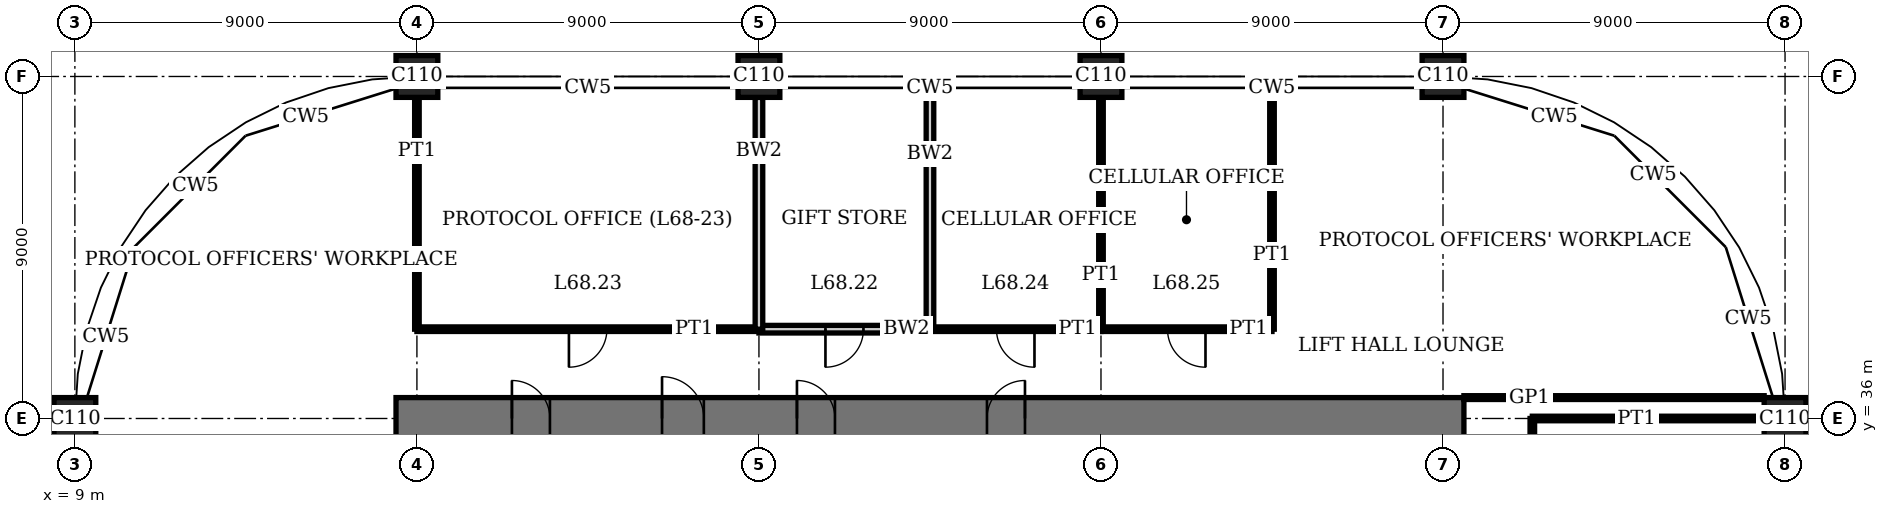
"""IFC4 building model, lengths in metres.
Left out: names, types, materials, properties, quantities, classifications, styles, units other than length and angle.
Written with IfcOpenShell. Run it as: python <this file> out.ifc"""

import sys

from ifc_helpers import new_model, si_unit, direction, frame, frame_2d, origin, origin_2d, place, context, subcontext, project, spatial, rectangle, extrude, element, fill, save


model = new_model("IFC4")
c1 = context("Model", 3, precision=1e-05, world=origin(), true_north=direction((0.0, 1.0)))
c2 = subcontext(c1, "Body", "Model", "MODEL_VIEW")
j1 = project(units=[si_unit("LENGTHUNIT", "METRE"), si_unit("PLANEANGLEUNIT", "RADIAN")], contexts=[c1])
p1 = place(None, origin())
s1 = spatial("IfcSite", under=j1, at=p1, CompositionType="ELEMENT")
p2 = place(p1, origin())
s2 = spatial("IfcBuilding", under=s1, at=p2, CompositionType="ELEMENT")
p3 = place(p2, frame((0.0, 0.0, 279.4)))
s3 = spatial("IfcBuildingStorey", under=s2, at=p3, CompositionType="ELEMENT", Elevation=279.4)
for number, where, z_axis, x_axis in (
    (1, (9.0, 36.0, 0.0), (0.0, 0.0, 1.0), (1.0, 0.0, 0.0)),
    (2, (18.0, 45.0, 0.0), (0.0, 0.0, 1.0), (1.0, 0.0, 0.0)),
    (3, (27.0, 45.0, 0.0), (0.0, 0.0, 1.0), (1.0, 0.0, 0.0)),
    (4, (36.0, 45.0, 0.0), (0.0, 0.0, 1.0), (1.0, 0.0, 0.0)),
    (5, (45.0, 45.0, 0.0), (0.0, 0.0, 1.0), (1.0, 0.0, 0.0)),
    (6, (54.0, 36.0, 0.0), (0.0, 0.0, 1.0), (1.0, 0.0, 0.0)),
):
    element("IfcColumn", number, at=place(p3, frame(where, z_axis=z_axis, x_axis=x_axis)), inside=s3, PredefinedType="COLUMN", context=c2, shape_type="SweptSolid", body=[
        extrude(rectangle(XDim=1.1, YDim=1.1, at=origin_2d()), origin(), (0.0, 0.0, 1.0), 4.0),
    ])
p4 = place(p3, frame((45.55, 36.0, 0.0), z_axis=(0.0, 0.0, 1.0), x_axis=(-1.0, 0.0, 0.0)))
e7 = element("IfcWall", 7, at=p4, inside=s3, PredefinedType="SHEAR", context=c2, shape_type="SweptSolid", body=[
    extrude(rectangle(XDim=28.1, YDim=1.1, at=frame_2d((14.05, 0.0))), origin(), (0.0, 0.0, 1.0), 4.0),
])
p5 = place(p4, frame((11.55, 0.0, 0.0)))
e8 = element("IfcOpeningElement", 8, at=p5, cuts=e7, PredefinedType="OPENING", context=c2, shape_type="SweptSolid", body=[
    extrude(rectangle(XDim=1.0, YDim=2.4, at=frame_2d((0.5, 1.2))), frame((0.0, 0.56, 0.0), z_axis=(0.0, -1.0, 0.0), x_axis=(1.0, 0.0, 0.0)), (0.0, 0.0, 1.0), 1.12),
])
p6 = place(p4, frame((16.55, 0.0, 0.0)))
e9 = element("IfcOpeningElement", 9, at=p6, cuts=e7, PredefinedType="OPENING", context=c2, shape_type="SweptSolid", body=[
    extrude(rectangle(XDim=1.0, YDim=2.4, at=frame_2d((0.5, 1.2))), frame((0.0, 0.56, 0.0), z_axis=(0.0, -1.0, 0.0), x_axis=(1.0, 0.0, 0.0)), (0.0, 0.0, 1.0), 1.12),
])
p7 = place(p4, frame((20.0, 0.0, 0.0)))
e10 = element("IfcOpeningElement", 10, at=p7, cuts=e7, PredefinedType="OPENING", context=c2, shape_type="SweptSolid", body=[
    extrude(rectangle(XDim=1.1, YDim=2.4, at=frame_2d((0.55, 1.2))), frame((0.0, 0.56, 0.0), z_axis=(0.0, -1.0, 0.0), x_axis=(1.0, 0.0, 0.0)), (0.0, 0.0, 1.0), 1.12),
])
p8 = place(p4, frame((24.05, 0.0, 0.0)))
e11 = element("IfcOpeningElement", 11, at=p8, cuts=e7, PredefinedType="OPENING", context=c2, shape_type="SweptSolid", body=[
    extrude(rectangle(XDim=1.0, YDim=2.4, at=frame_2d((0.5, 1.2))), frame((0.0, 0.56, 0.0), z_axis=(0.0, -1.0, 0.0), x_axis=(1.0, 0.0, 0.0)), (0.0, 0.0, 1.0), 1.12),
])
p9 = place(p3, frame((47.35, 36.0, 0.0), z_axis=(0.0, 0.0, 1.0), x_axis=(1.0, 0.0, 0.0)))
e12 = element("IfcWall", 12, at=p9, inside=s3, PredefinedType="PARTITIONING", context=c2, shape_type="SweptSolid", body=[
    extrude(rectangle(XDim=6.1, YDim=0.12, at=frame_2d((3.05, 0.0))), origin(), (0.0, 0.0, 1.0), 3.05),
])
p10 = place(p3, frame((45.55, 36.55, 0.0), z_axis=(0.0, 0.0, 1.0), x_axis=(1.0, 0.0, 0.0)))
e13 = element("IfcWall", 13, at=p10, inside=s3, PredefinedType="PARTITIONING", context=c2, shape_type="SweptSolid", body=[
    extrude(rectangle(XDim=7.9, YDim=0.1, at=frame_2d((3.95, 0.0))), origin(), (0.0, 0.0, 1.0), 3.75),
])
p11 = place(p3, frame((27.0, 38.35, 0.0), z_axis=(0.0, 0.0, 1.0), x_axis=(1.0, 0.0, 0.0)))
e14 = element("IfcWall", 14, at=p11, inside=s3, PredefinedType="SOLIDWALL", context=c2, shape_type="SweptSolid", body=[
    extrude(rectangle(XDim=4.5, YDim=0.2, at=frame_2d((2.25, 0.0))), origin(), (0.0, 0.0, 1.0), 3.75),
])
p12 = place(p11, frame((1.75, 0.0, 0.0)))
e15 = element("IfcOpeningElement", 15, at=p12, cuts=e14, PredefinedType="OPENING", context=c2, shape_type="SweptSolid", body=[
    extrude(rectangle(XDim=1.0, YDim=2.4, at=frame_2d((0.5, 1.2))), frame((0.0, 0.11, 0.0), z_axis=(0.0, -1.0, 0.0), x_axis=(1.0, 0.0, 0.0)), (0.0, 0.0, 1.0), 0.22),
])
p13 = place(p3, frame((18.0, 38.35, 0.0), z_axis=(0.0, 0.0, 1.0), x_axis=(1.0, 0.0, 0.0)))
e16 = element("IfcWall", 16, at=p13, inside=s3, PredefinedType="PARTITIONING", context=c2, shape_type="SweptSolid", body=[
    extrude(rectangle(XDim=9.0, YDim=0.12, at=frame_2d((4.5, 0.0))), origin(), (0.0, 0.0, 1.0), 3.75),
])
p14 = place(p13, frame((4.0, 0.0, 0.0)))
e17 = element("IfcOpeningElement", 17, at=p14, cuts=e16, PredefinedType="OPENING", context=c2, shape_type="SweptSolid", body=[
    extrude(rectangle(XDim=1.0, YDim=2.4, at=frame_2d((0.5, 1.2))), frame((0.0, 0.07, 0.0), z_axis=(0.0, -1.0, 0.0), x_axis=(1.0, 0.0, 0.0)), (0.0, 0.0, 1.0), 0.14),
])
p15 = place(p3, frame((31.5, 38.35, 0.0), z_axis=(0.0, 0.0, 1.0), x_axis=(1.0, 0.0, 0.0)))
e18 = element("IfcWall", 18, at=p15, inside=s3, PredefinedType="PARTITIONING", context=c2, shape_type="SweptSolid", body=[
    extrude(rectangle(XDim=4.5, YDim=0.12, at=frame_2d((2.25, 0.0))), origin(), (0.0, 0.0, 1.0), 3.75),
])
p16 = place(p15, frame((1.75, 0.0, 0.0)))
e19 = element("IfcOpeningElement", 19, at=p16, cuts=e18, PredefinedType="OPENING", context=c2, shape_type="SweptSolid", body=[
    extrude(rectangle(XDim=1.0, YDim=2.4, at=frame_2d((0.5, 1.2))), frame((0.0, 0.07, 0.0), z_axis=(0.0, -1.0, 0.0), x_axis=(1.0, 0.0, 0.0)), (0.0, 0.0, 1.0), 0.14),
])
p17 = place(p3, frame((36.0, 38.35, 0.0), z_axis=(0.0, 0.0, 1.0), x_axis=(1.0, 0.0, 0.0)))
e20 = element("IfcWall", 20, at=p17, inside=s3, PredefinedType="PARTITIONING", context=c2, shape_type="SweptSolid", body=[
    extrude(rectangle(XDim=4.5, YDim=0.12, at=frame_2d((2.25, 0.0))), origin(), (0.0, 0.0, 1.0), 3.75),
])
p18 = place(p17, frame((1.75, 0.0, 0.0)))
e21 = element("IfcOpeningElement", 21, at=p18, cuts=e20, PredefinedType="OPENING", context=c2, shape_type="SweptSolid", body=[
    extrude(rectangle(XDim=1.0, YDim=2.4, at=frame_2d((0.5, 1.2))), frame((0.0, 0.07, 0.0), z_axis=(0.0, -1.0, 0.0), x_axis=(1.0, 0.0, 0.0)), (0.0, 0.0, 1.0), 0.14),
])
p19 = place(p3, frame((18.0, 38.35, 0.0), z_axis=(0.0, 0.0, 1.0), x_axis=(0.0, 1.0, 0.0)))
e22 = element("IfcWall", 22, at=p19, inside=s3, PredefinedType="PARTITIONING", context=c2, shape_type="SweptSolid", body=[
    extrude(rectangle(XDim=6.1, YDim=0.12, at=frame_2d((3.05, 0.0))), origin(), (0.0, 0.0, 1.0), 3.05),
])
p20 = place(p3, frame((27.0, 38.35, 0.0), z_axis=(0.0, 0.0, 1.0), x_axis=(0.0, 1.0, 0.0)))
e23 = element("IfcWall", 23, at=p20, inside=s3, PredefinedType="SOLIDWALL", context=c2, shape_type="SweptSolid", body=[
    extrude(rectangle(XDim=6.1, YDim=0.2, at=frame_2d((3.05, 0.0))), origin(), (0.0, 0.0, 1.0), 3.05),
])
p21 = place(p3, frame((31.5, 38.35, 0.0), z_axis=(0.0, 0.0, 1.0), x_axis=(0.0, 1.0, 0.0)))
e24 = element("IfcWall", 24, at=p21, inside=s3, PredefinedType="SOLIDWALL", context=c2, shape_type="SweptSolid", body=[
    extrude(rectangle(XDim=6.34, YDim=0.2, at=frame_2d((3.17, 0.0))), origin(), (0.0, 0.0, 1.0), 3.75),
])
p22 = place(p3, frame((36.0, 38.35, 0.0), z_axis=(0.0, 0.0, 1.0), x_axis=(0.0, 1.0, 0.0)))
e25 = element("IfcWall", 25, at=p22, inside=s3, PredefinedType="PARTITIONING", context=c2, shape_type="SweptSolid", body=[
    extrude(rectangle(XDim=6.1, YDim=0.12, at=frame_2d((3.05, 0.0))), origin(), (0.0, 0.0, 1.0), 3.05),
])
p23 = place(p3, frame((40.5, 38.35, 0.0), z_axis=(0.0, 0.0, 1.0), x_axis=(0.0, 1.0, 0.0)))
e26 = element("IfcWall", 26, at=p23, inside=s3, PredefinedType="PARTITIONING", context=c2, shape_type="SweptSolid", body=[
    extrude(rectangle(XDim=6.34, YDim=0.12, at=frame_2d((3.17, 0.0))), origin(), (0.0, 0.0, 1.0), 3.75),
])
p24 = place(p3, frame((47.35, 31.5, 0.0), z_axis=(0.0, 0.0, 1.0), x_axis=(0.0, 1.0, 0.0)))
e27 = element("IfcWall", 27, at=p24, inside=s3, PredefinedType="PARTITIONING", context=c2, shape_type="SweptSolid", body=[
    extrude(rectangle(XDim=4.5, YDim=0.12, at=frame_2d((2.25, 0.0))), origin(), (0.0, 0.0, 1.0), 3.75),
])
p25 = place(p24, frame((1.75, 0.0, 0.0)))
e28 = element("IfcOpeningElement", 28, at=p25, cuts=e27, PredefinedType="OPENING", context=c2, shape_type="SweptSolid", body=[
    extrude(rectangle(XDim=1.0, YDim=2.4, at=frame_2d((0.5, 1.2))), frame((0.0, 0.07, 0.0), z_axis=(0.0, -1.0, 0.0), x_axis=(1.0, 0.0, 0.0)), (0.0, 0.0, 1.0), 0.14),
])
p26 = place(p5, origin())
e29 = element("IfcDoor", 29, at=p26, inside=s3, OperationType="SINGLE_SWING_LEFT", PredefinedType="DOOR", context=c2, shape_type="SweptSolid", body=[
    extrude(rectangle(XDim=1.0, YDim=2.4, at=frame_2d((0.5, 1.2))), frame((0.0, 0.025, 0.0), z_axis=(0.0, -1.0, 0.0), x_axis=(1.0, 0.0, 0.0)), (0.0, 0.0, 1.0), 0.05),
    extrude(rectangle(XDim=0.04, YDim=2.4, at=frame_2d((0.02, 1.2))), frame((0.0, 0.4, 0.0), z_axis=(0.0, -1.0, 0.0), x_axis=(1.0, 0.0, 0.0)), (0.0, 0.0, 1.0), 0.8),
    extrude(rectangle(XDim=0.04, YDim=2.4, at=frame_2d((0.98, 1.2))), frame((0.0, 0.4, 0.0), z_axis=(0.0, -1.0, 0.0), x_axis=(1.0, 0.0, 0.0)), (0.0, 0.0, 1.0), 0.8),
    extrude(rectangle(XDim=1.0, YDim=0.04, at=frame_2d((0.5, 2.38))), frame((0.0, 0.4, 0.0), z_axis=(0.0, -1.0, 0.0), x_axis=(1.0, 0.0, 0.0)), (0.0, 0.0, 1.0), 0.8),
])
fill(e8, e29)
p27 = place(p6, origin())
e30 = element("IfcDoor", 30, at=p27, inside=s3, OperationType="SINGLE_SWING_RIGHT", PredefinedType="DOOR", context=c2, shape_type="SweptSolid", body=[
    extrude(rectangle(XDim=1.0, YDim=2.4, at=frame_2d((0.5, 1.2))), frame((0.0, 0.025, 0.0), z_axis=(0.0, -1.0, 0.0), x_axis=(1.0, 0.0, 0.0)), (0.0, 0.0, 1.0), 0.05),
    extrude(rectangle(XDim=0.04, YDim=2.4, at=frame_2d((0.02, 1.2))), frame((0.0, 0.4, 0.0), z_axis=(0.0, -1.0, 0.0), x_axis=(1.0, 0.0, 0.0)), (0.0, 0.0, 1.0), 0.8),
    extrude(rectangle(XDim=0.04, YDim=2.4, at=frame_2d((0.98, 1.2))), frame((0.0, 0.4, 0.0), z_axis=(0.0, -1.0, 0.0), x_axis=(1.0, 0.0, 0.0)), (0.0, 0.0, 1.0), 0.8),
    extrude(rectangle(XDim=1.0, YDim=0.04, at=frame_2d((0.5, 2.38))), frame((0.0, 0.4, 0.0), z_axis=(0.0, -1.0, 0.0), x_axis=(1.0, 0.0, 0.0)), (0.0, 0.0, 1.0), 0.8),
])
fill(e9, e30)
p28 = place(p7, origin())
e31 = element("IfcDoor", 31, at=p28, inside=s3, OperationType="SINGLE_SWING_RIGHT", PredefinedType="DOOR", context=c2, shape_type="SweptSolid", body=[
    extrude(rectangle(XDim=1.1, YDim=2.4, at=frame_2d((0.55, 1.2))), frame((0.0, 0.025, 0.0), z_axis=(0.0, -1.0, 0.0), x_axis=(1.0, 0.0, 0.0)), (0.0, 0.0, 1.0), 0.05),
    extrude(rectangle(XDim=0.04, YDim=2.4, at=frame_2d((0.02, 1.2))), frame((0.0, 0.44, 0.0), z_axis=(0.0, -1.0, 0.0), x_axis=(1.0, 0.0, 0.0)), (0.0, 0.0, 1.0), 0.88),
    extrude(rectangle(XDim=0.04, YDim=2.4, at=frame_2d((1.08, 1.2))), frame((0.0, 0.44, 0.0), z_axis=(0.0, -1.0, 0.0), x_axis=(1.0, 0.0, 0.0)), (0.0, 0.0, 1.0), 0.88),
    extrude(rectangle(XDim=1.1, YDim=0.04, at=frame_2d((0.55, 2.38))), frame((0.0, 0.44, 0.0), z_axis=(0.0, -1.0, 0.0), x_axis=(1.0, 0.0, 0.0)), (0.0, 0.0, 1.0), 0.88),
])
fill(e10, e31)
p29 = place(p8, origin())
e32 = element("IfcDoor", 32, at=p29, inside=s3, OperationType="SINGLE_SWING_RIGHT", PredefinedType="DOOR", context=c2, shape_type="SweptSolid", body=[
    extrude(rectangle(XDim=1.0, YDim=2.4, at=frame_2d((0.5, 1.2))), frame((0.0, 0.025, 0.0), z_axis=(0.0, -1.0, 0.0), x_axis=(1.0, 0.0, 0.0)), (0.0, 0.0, 1.0), 0.05),
    extrude(rectangle(XDim=0.04, YDim=2.4, at=frame_2d((0.02, 1.2))), frame((0.0, 0.4, 0.0), z_axis=(0.0, -1.0, 0.0), x_axis=(1.0, 0.0, 0.0)), (0.0, 0.0, 1.0), 0.8),
    extrude(rectangle(XDim=0.04, YDim=2.4, at=frame_2d((0.98, 1.2))), frame((0.0, 0.4, 0.0), z_axis=(0.0, -1.0, 0.0), x_axis=(1.0, 0.0, 0.0)), (0.0, 0.0, 1.0), 0.8),
    extrude(rectangle(XDim=1.0, YDim=0.04, at=frame_2d((0.5, 2.38))), frame((0.0, 0.4, 0.0), z_axis=(0.0, -1.0, 0.0), x_axis=(1.0, 0.0, 0.0)), (0.0, 0.0, 1.0), 0.8),
])
fill(e11, e32)
p30 = place(p12, origin())
e33 = element("IfcDoor", 33, at=p30, inside=s3, OperationType="SINGLE_SWING_LEFT", PredefinedType="DOOR", context=c2, shape_type="SweptSolid", body=[
    extrude(rectangle(XDim=1.0, YDim=2.4, at=frame_2d((0.5, 1.2))), frame((0.0, 0.035, 0.0), z_axis=(0.0, -1.0, 0.0), x_axis=(1.0, 0.0, 0.0)), (0.0, 0.0, 1.0), 0.07),
])
fill(e15, e33)
p31 = place(p14, origin())
e34 = element("IfcDoor", 34, at=p31, inside=s3, OperationType="SINGLE_SWING_LEFT", PredefinedType="DOOR", context=c2, shape_type="SweptSolid", body=[
    extrude(rectangle(XDim=1.0, YDim=2.4, at=frame_2d((0.5, 1.2))), frame((0.0, 0.025, 0.0), z_axis=(0.0, -1.0, 0.0), x_axis=(1.0, 0.0, 0.0)), (0.0, 0.0, 1.0), 0.05),
])
fill(e17, e34)
p32 = place(p16, origin())
e35 = element("IfcDoor", 35, at=p32, inside=s3, OperationType="SINGLE_SWING_RIGHT", PredefinedType="DOOR", context=c2, shape_type="SweptSolid", body=[
    extrude(rectangle(XDim=1.0, YDim=2.4, at=frame_2d((0.5, 1.2))), frame((0.0, 0.025, 0.0), z_axis=(0.0, -1.0, 0.0), x_axis=(1.0, 0.0, 0.0)), (0.0, 0.0, 1.0), 0.05),
])
fill(e19, e35)
p33 = place(p18, origin())
e36 = element("IfcDoor", 36, at=p33, inside=s3, OperationType="SINGLE_SWING_RIGHT", PredefinedType="DOOR", context=c2, shape_type="SweptSolid", body=[
    extrude(rectangle(XDim=1.0, YDim=2.4, at=frame_2d((0.5, 1.2))), frame((0.0, 0.025, 0.0), z_axis=(0.0, -1.0, 0.0), x_axis=(1.0, 0.0, 0.0)), (0.0, 0.0, 1.0), 0.05),
])
fill(e21, e36)
save(model, sys.argv[1])
